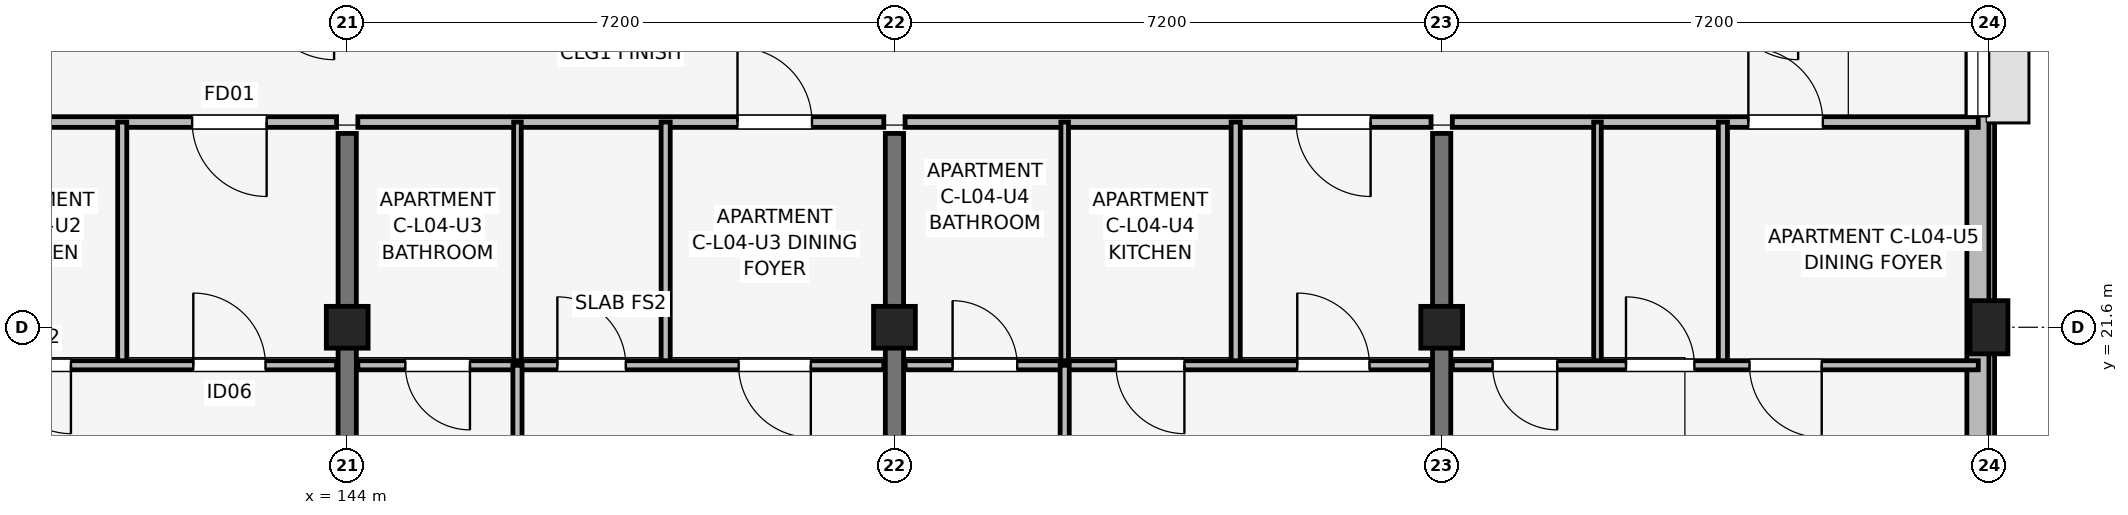
"""IFC4 building model, lengths in metres.
Left out: names, types, materials, properties, quantities, classifications, styles, units other than length and angle.
Written with IfcOpenShell. Run it as: python <this file> out.ifc"""

import sys

from ifc_helpers import new_model, si_unit, direction, frame, frame_2d, origin, origin_2d, place, context, subcontext, project, spatial, rectangle, extrude, element, fill, save


model = new_model("IFC4")
c1 = context("Model", 3, precision=1e-05, world=origin(), true_north=direction((0.0, 1.0)))
c2 = subcontext(c1, "Body", "Model", "MODEL_VIEW")
j1 = project(units=[si_unit("LENGTHUNIT", "METRE"), si_unit("PLANEANGLEUNIT", "RADIAN")], contexts=[c1])
p1 = place(None, origin())
s1 = spatial("IfcSite", under=j1, at=p1, CompositionType="ELEMENT")
p2 = place(p1, origin())
s2 = spatial("IfcBuilding", under=s1, at=p2, CompositionType="ELEMENT")
p3 = place(p2, frame((0.0, 0.0, 15.0)))
s3 = spatial("IfcBuildingStorey", under=s2, at=p3, CompositionType="ELEMENT", Elevation=15.0)
for number, where, z_axis, x_axis in (
    (1, (144.0, 21.6, 0.0), (0.0, 0.0, 1.0), (1.0, 0.0, 0.0)),
    (2, (151.2, 21.6, 0.0), (0.0, 0.0, 1.0), (1.0, 0.0, 0.0)),
    (3, (158.4, 21.6, 0.0), (0.0, 0.0, 1.0), (1.0, 0.0, 0.0)),
):
    element("IfcColumn", number, at=place(p3, frame(where, z_axis=z_axis, x_axis=x_axis)), inside=s3, PredefinedType="COLUMN", context=c2, shape_type="SweptSolid", body=[
        extrude(rectangle(XDim=0.55, YDim=0.55, at=origin_2d()), origin(), (0.0, 0.0, 1.0), 3.15),
    ])
p4 = place(p3, frame((165.6, 21.6, 0.0), z_axis=(0.0, 0.0, 1.0), x_axis=(1.0, 0.0, 0.0)))
e4 = element("IfcColumn", 4, at=p4, inside=s3, PredefinedType="COLUMN", context=c2, shape_type="SweptSolid", body=[
    extrude(rectangle(XDim=0.5, YDim=0.7, at=origin_2d()), origin(), (0.0, 0.0, 1.0), 3.15),
])
for number, where, z_axis, x_axis in (
    (5, (144.0, 14.75, 0.0), (0.0, 0.0, 1.0), (0.0, 1.0, 0.0)),
    (6, (151.2, 14.75, 0.0), (0.0, 0.0, 1.0), (0.0, 1.0, 0.0)),
    (7, (158.4, 14.75, 0.0), (0.0, 0.0, 1.0), (0.0, 1.0, 0.0)),
):
    element("IfcWall", number, at=place(p3, frame(where, z_axis=z_axis, x_axis=x_axis)), inside=s3, PredefinedType="SHEAR", context=c2, shape_type="SweptSolid", body=[
        extrude(rectangle(XDim=9.4, YDim=0.24, at=frame_2d((4.7, 0.0))), origin(), (0.0, 0.0, 1.0), 3.15),
    ])
p5 = place(p3, frame((165.455, 17.4, 0.0), z_axis=(0.0, 0.0, 1.0), x_axis=(0.0, 1.0, 0.0)))
e8 = element("IfcWall", 8, at=p5, inside=s3, PredefinedType="SOLIDWALL", context=c2, shape_type="SweptSolid", body=[
    extrude(rectangle(XDim=15.6, YDim=0.29, at=frame_2d((7.8, 0.0))), origin(), (0.0, 0.0, 1.0), 2.38),
])
p6 = place(p5, frame((6.975, 0.0, 1.05)))
e9 = element("IfcOpeningElement", 9, at=p6, cuts=e8, PredefinedType="OPENING", context=c2, shape_type="SweptSolid", body=[
    extrude(rectangle(XDim=1.65, YDim=1.15, at=frame_2d((0.825, 0.575))), frame((0.0, 0.155, 0.0), z_axis=(0.0, -1.0, 0.0), x_axis=(1.0, 0.0, 0.0)), (0.0, 0.0, 1.0), 0.31),
])
p7 = place(p5, frame((1.255, 0.0, 0.67)))
e10 = element("IfcOpeningElement", 10, at=p7, cuts=e8, PredefinedType="OPENING", context=c2, shape_type="SweptSolid", body=[
    extrude(rectangle(XDim=1.42, YDim=1.6, at=frame_2d((0.71, 0.8))), frame((0.0, 0.155, 0.0), z_axis=(0.0, -1.0, 0.0), x_axis=(1.0, 0.0, 0.0)), (0.0, 0.0, 1.0), 0.31),
])
p8 = place(p3, frame((136.94, 24.3, 0.0), z_axis=(0.0, 0.0, 1.0), x_axis=(1.0, 0.0, 0.0)))
e11 = element("IfcWall", 11, at=p8, inside=s3, PredefinedType="PARTITIONING", context=c2, shape_type="SweptSolid", body=[
    extrude(rectangle(XDim=6.92, YDim=0.14, at=frame_2d((3.46, 0.0))), origin(), (0.0, 0.0, 1.0), 2.38),
])
p9 = place(p8, frame((6.0, 0.0, 0.0), z_axis=(0.0, 0.0, 1.0), x_axis=(-1.0, 0.0, 0.0)))
e12 = element("IfcOpeningElement", 12, at=p9, cuts=e11, PredefinedType="OPENING", context=c2, shape_type="SweptSolid", body=[
    extrude(rectangle(XDim=0.98, YDim=2.1, at=frame_2d((0.49, 1.05))), frame((0.0, 0.08, 0.0), z_axis=(0.0, -1.0, 0.0), x_axis=(1.0, 0.0, 0.0)), (0.0, 0.0, 1.0), 0.16),
])
p10 = place(p3, frame((141.04, 21.1, 0.0), z_axis=(0.0, 0.0, 1.0), x_axis=(0.0, 1.0, 0.0)))
e13 = element("IfcWall", 13, at=p10, inside=s3, PredefinedType="PARTITIONING", context=c2, shape_type="SweptSolid", body=[
    extrude(rectangle(XDim=3.2, YDim=0.12, at=frame_2d((1.6, 0.0))), origin(), (0.0, 0.0, 1.0), 2.375),
])
p11 = place(p3, frame((136.94, 21.1, 0.0), z_axis=(0.0, 0.0, 1.0), x_axis=(1.0, 0.0, 0.0)))
e14 = element("IfcWall", 14, at=p11, inside=s3, PredefinedType="PARTITIONING", context=c2, shape_type="SweptSolid", body=[
    extrude(rectangle(XDim=6.92, YDim=0.12, at=frame_2d((3.46, 0.0))), origin(), (0.0, 0.0, 1.0), 2.38),
])
p12 = place(p11, frame((0.5, 0.0, 0.0)))
e15 = element("IfcOpeningElement", 15, at=p12, cuts=e14, PredefinedType="OPENING", context=c2, shape_type="SweptSolid", body=[
    extrude(rectangle(XDim=0.85, YDim=2.08, at=frame_2d((0.425, 1.04))), frame((0.0, 0.07, 0.0), z_axis=(0.0, -1.0, 0.0), x_axis=(1.0, 0.0, 0.0)), (0.0, 0.0, 1.0), 0.14),
])
p13 = place(p11, frame((3.425, 0.0, 0.0), z_axis=(0.0, 0.0, 1.0), x_axis=(-1.0, 0.0, 0.0)))
e16 = element("IfcOpeningElement", 16, at=p13, cuts=e14, PredefinedType="OPENING", context=c2, shape_type="SweptSolid", body=[
    extrude(rectangle(XDim=0.9, YDim=2.08, at=frame_2d((0.45, 1.04))), frame((0.0, 0.07, 0.0), z_axis=(0.0, -1.0, 0.0), x_axis=(1.0, 0.0, 0.0)), (0.0, 0.0, 1.0), 0.14),
])
p14 = place(p11, frame((5.035, 0.0, 0.0)))
e17 = element("IfcOpeningElement", 17, at=p14, cuts=e14, PredefinedType="OPENING", context=c2, shape_type="SweptSolid", body=[
    extrude(rectangle(XDim=0.95, YDim=2.08, at=frame_2d((0.475, 1.04))), frame((0.0, 0.07, 0.0), z_axis=(0.0, -1.0, 0.0), x_axis=(1.0, 0.0, 0.0)), (0.0, 0.0, 1.0), 0.14),
])
p15 = place(p3, frame((144.14, 24.3, 0.0), z_axis=(0.0, 0.0, 1.0), x_axis=(1.0, 0.0, 0.0)))
e18 = element("IfcWall", 18, at=p15, inside=s3, PredefinedType="PARTITIONING", context=c2, shape_type="SweptSolid", body=[
    extrude(rectangle(XDim=6.92, YDim=0.14, at=frame_2d((3.46, 0.0))), origin(), (0.0, 0.0, 1.0), 2.38),
])
p16 = place(p15, frame((4.995, 0.0, 0.0)))
e19 = element("IfcOpeningElement", 19, at=p16, cuts=e18, PredefinedType="OPENING", context=c2, shape_type="SweptSolid", body=[
    extrude(rectangle(XDim=0.98, YDim=2.1, at=frame_2d((0.49, 1.05))), frame((0.0, 0.08, 0.0), z_axis=(0.0, -1.0, 0.0), x_axis=(1.0, 0.0, 0.0)), (0.0, 0.0, 1.0), 0.16),
])
p17 = place(p3, frame((146.24, 21.1, 0.0), z_axis=(0.0, 0.0, 1.0), x_axis=(0.0, 1.0, 0.0)))
e20 = element("IfcWall", 20, at=p17, inside=s3, PredefinedType="PARTITIONING", context=c2, shape_type="SweptSolid", body=[
    extrude(rectangle(XDim=3.2, YDim=0.1, at=frame_2d((1.6, 0.0))), origin(), (0.0, 0.0, 1.0), 2.375),
])
p18 = place(p3, frame((148.19, 21.1, 0.0), z_axis=(0.0, 0.0, 1.0), x_axis=(0.0, 1.0, 0.0)))
e21 = element("IfcWall", 21, at=p18, inside=s3, PredefinedType="PARTITIONING", context=c2, shape_type="SweptSolid", body=[
    extrude(rectangle(XDim=3.2, YDim=0.12, at=frame_2d((1.6, 0.0))), origin(), (0.0, 0.0, 1.0), 2.375),
])
p19 = place(p3, frame((144.14, 21.1, 0.0), z_axis=(0.0, 0.0, 1.0), x_axis=(1.0, 0.0, 0.0)))
e22 = element("IfcWall", 22, at=p19, inside=s3, PredefinedType="PARTITIONING", context=c2, shape_type="SweptSolid", body=[
    extrude(rectangle(XDim=6.92, YDim=0.12, at=frame_2d((3.46, 0.0))), origin(), (0.0, 0.0, 1.0), 2.38),
])
p20 = place(p19, frame((1.475, 0.0, 0.0), z_axis=(0.0, 0.0, 1.0), x_axis=(-1.0, 0.0, 0.0)))
e23 = element("IfcOpeningElement", 23, at=p20, cuts=e22, PredefinedType="OPENING", context=c2, shape_type="SweptSolid", body=[
    extrude(rectangle(XDim=0.85, YDim=2.08, at=frame_2d((0.425, 1.04))), frame((0.0, 0.07, 0.0), z_axis=(0.0, -1.0, 0.0), x_axis=(1.0, 0.0, 0.0)), (0.0, 0.0, 1.0), 0.14),
])
p21 = place(p19, frame((2.625, 0.0, 0.0)))
e24 = element("IfcOpeningElement", 24, at=p21, cuts=e22, PredefinedType="OPENING", context=c2, shape_type="SweptSolid", body=[
    extrude(rectangle(XDim=0.9, YDim=2.08, at=frame_2d((0.45, 1.04))), frame((0.0, 0.07, 0.0), z_axis=(0.0, -1.0, 0.0), x_axis=(1.0, 0.0, 0.0)), (0.0, 0.0, 1.0), 0.14),
])
p22 = place(p19, frame((5.96, 0.0, 0.0), z_axis=(0.0, 0.0, 1.0), x_axis=(-1.0, 0.0, 0.0)))
e25 = element("IfcOpeningElement", 25, at=p22, cuts=e22, PredefinedType="OPENING", context=c2, shape_type="SweptSolid", body=[
    extrude(rectangle(XDim=0.95, YDim=2.08, at=frame_2d((0.475, 1.04))), frame((0.0, 0.07, 0.0), z_axis=(0.0, -1.0, 0.0), x_axis=(1.0, 0.0, 0.0)), (0.0, 0.0, 1.0), 0.14),
])
p23 = place(p3, frame((146.24, 14.7, 0.0), z_axis=(0.0, 0.0, 1.0), x_axis=(0.0, 1.0, 0.0)))
e26 = element("IfcWall", 26, at=p23, inside=s3, PredefinedType="PARTITIONING", context=c2, shape_type="SweptSolid", body=[
    extrude(rectangle(XDim=6.4, YDim=0.12, at=frame_2d((3.2, 0.0))), origin(), (0.0, 0.0, 1.0), 2.38),
])
p24 = place(p23, frame((2.75, 0.0, 0.0)))
e27 = element("IfcOpeningElement", 27, at=p24, cuts=e26, PredefinedType="OPENING", context=c2, shape_type="SweptSolid", body=[
    extrude(rectangle(XDim=0.9, YDim=2.08, at=frame_2d((0.45, 1.04))), frame((0.0, 0.07, 0.0), z_axis=(0.0, -1.0, 0.0), x_axis=(1.0, 0.0, 0.0)), (0.0, 0.0, 1.0), 0.14),
])
p25 = place(p3, frame((151.34, 24.3, 0.0), z_axis=(0.0, 0.0, 1.0), x_axis=(1.0, 0.0, 0.0)))
e28 = element("IfcWall", 28, at=p25, inside=s3, PredefinedType="PARTITIONING", context=c2, shape_type="SweptSolid", body=[
    extrude(rectangle(XDim=6.92, YDim=0.14, at=frame_2d((3.46, 0.0))), origin(), (0.0, 0.0, 1.0), 2.38),
])
p26 = place(p25, frame((6.125, 0.0, 0.0), z_axis=(0.0, 0.0, 1.0), x_axis=(-1.0, 0.0, 0.0)))
e29 = element("IfcOpeningElement", 29, at=p26, cuts=e28, PredefinedType="OPENING", context=c2, shape_type="SweptSolid", body=[
    extrude(rectangle(XDim=0.98, YDim=2.1, at=frame_2d((0.49, 1.05))), frame((0.0, 0.08, 0.0), z_axis=(0.0, -1.0, 0.0), x_axis=(1.0, 0.0, 0.0)), (0.0, 0.0, 1.0), 0.16),
])
p27 = place(p3, frame((153.44, 21.1, 0.0), z_axis=(0.0, 0.0, 1.0), x_axis=(0.0, 1.0, 0.0)))
e30 = element("IfcWall", 30, at=p27, inside=s3, PredefinedType="PARTITIONING", context=c2, shape_type="SweptSolid", body=[
    extrude(rectangle(XDim=3.2, YDim=0.1, at=frame_2d((1.6, 0.0))), origin(), (0.0, 0.0, 1.0), 2.375),
])
p28 = place(p3, frame((155.69, 21.1, 0.0), z_axis=(0.0, 0.0, 1.0), x_axis=(0.0, 1.0, 0.0)))
e31 = element("IfcWall", 31, at=p28, inside=s3, PredefinedType="PARTITIONING", context=c2, shape_type="SweptSolid", body=[
    extrude(rectangle(XDim=3.2, YDim=0.12, at=frame_2d((1.6, 0.0))), origin(), (0.0, 0.0, 1.0), 2.375),
])
p29 = place(p3, frame((151.34, 21.1, 0.0), z_axis=(0.0, 0.0, 1.0), x_axis=(1.0, 0.0, 0.0)))
e32 = element("IfcWall", 32, at=p29, inside=s3, PredefinedType="PARTITIONING", context=c2, shape_type="SweptSolid", body=[
    extrude(rectangle(XDim=6.92, YDim=0.12, at=frame_2d((3.46, 0.0))), origin(), (0.0, 0.0, 1.0), 2.38),
])
p30 = place(p29, frame((0.625, 0.0, 0.0)))
e33 = element("IfcOpeningElement", 33, at=p30, cuts=e32, PredefinedType="OPENING", context=c2, shape_type="SweptSolid", body=[
    extrude(rectangle(XDim=0.85, YDim=2.08, at=frame_2d((0.425, 1.04))), frame((0.0, 0.07, 0.0), z_axis=(0.0, -1.0, 0.0), x_axis=(1.0, 0.0, 0.0)), (0.0, 0.0, 1.0), 0.14),
])
p31 = place(p29, frame((3.675, 0.0, 0.0), z_axis=(0.0, 0.0, 1.0), x_axis=(-1.0, 0.0, 0.0)))
e34 = element("IfcOpeningElement", 34, at=p31, cuts=e32, PredefinedType="OPENING", context=c2, shape_type="SweptSolid", body=[
    extrude(rectangle(XDim=0.9, YDim=2.08, at=frame_2d((0.45, 1.04))), frame((0.0, 0.07, 0.0), z_axis=(0.0, -1.0, 0.0), x_axis=(1.0, 0.0, 0.0)), (0.0, 0.0, 1.0), 0.14),
])
p32 = place(p29, frame((5.16, 0.0, 0.0)))
e35 = element("IfcOpeningElement", 35, at=p32, cuts=e32, PredefinedType="OPENING", context=c2, shape_type="SweptSolid", body=[
    extrude(rectangle(XDim=0.95, YDim=2.08, at=frame_2d((0.475, 1.04))), frame((0.0, 0.07, 0.0), z_axis=(0.0, -1.0, 0.0), x_axis=(1.0, 0.0, 0.0)), (0.0, 0.0, 1.0), 0.14),
])
p33 = place(p3, frame((153.44, 14.7, 0.0), z_axis=(0.0, 0.0, 1.0), x_axis=(0.0, 1.0, 0.0)))
e36 = element("IfcWall", 36, at=p33, inside=s3, PredefinedType="PARTITIONING", context=c2, shape_type="SweptSolid", body=[
    extrude(rectangle(XDim=6.4, YDim=0.12, at=frame_2d((3.2, 0.0))), origin(), (0.0, 0.0, 1.0), 2.38),
])
p34 = place(p33, frame((3.65, 0.0, 0.0), z_axis=(0.0, 0.0, 1.0), x_axis=(-1.0, 0.0, 0.0)))
e37 = element("IfcOpeningElement", 37, at=p34, cuts=e36, PredefinedType="OPENING", context=c2, shape_type="SweptSolid", body=[
    extrude(rectangle(XDim=0.9, YDim=2.08, at=frame_2d((0.45, 1.04))), frame((0.0, 0.07, 0.0), z_axis=(0.0, -1.0, 0.0), x_axis=(1.0, 0.0, 0.0)), (0.0, 0.0, 1.0), 0.14),
])
p35 = place(p3, frame((158.54, 24.3, 0.0), z_axis=(0.0, 0.0, 1.0), x_axis=(1.0, 0.0, 0.0)))
e38 = element("IfcWall", 38, at=p35, inside=s3, PredefinedType="PARTITIONING", context=c2, shape_type="SweptSolid", body=[
    extrude(rectangle(XDim=6.92, YDim=0.14, at=frame_2d((3.46, 0.0))), origin(), (0.0, 0.0, 1.0), 2.38),
])
p36 = place(p35, frame((3.895, 0.0, 0.0)))
e39 = element("IfcOpeningElement", 39, at=p36, cuts=e38, PredefinedType="OPENING", context=c2, shape_type="SweptSolid", body=[
    extrude(rectangle(XDim=0.98, YDim=2.1, at=frame_2d((0.49, 1.05))), frame((0.0, 0.08, 0.0), z_axis=(0.0, -1.0, 0.0), x_axis=(1.0, 0.0, 0.0)), (0.0, 0.0, 1.0), 0.16),
])
p37 = place(p3, frame((160.45, 21.1, 0.0), z_axis=(0.0, 0.0, 1.0), x_axis=(0.0, 1.0, 0.0)))
e40 = element("IfcWall", 40, at=p37, inside=s3, PredefinedType="PARTITIONING", context=c2, shape_type="SweptSolid", body=[
    extrude(rectangle(XDim=3.2, YDim=0.1, at=frame_2d((1.6, 0.0))), origin(), (0.0, 0.0, 1.0), 2.375),
])
p38 = place(p3, frame((162.1, 21.1, 0.0), z_axis=(0.0, 0.0, 1.0), x_axis=(0.0, 1.0, 0.0)))
e41 = element("IfcWall", 41, at=p38, inside=s3, PredefinedType="PARTITIONING", context=c2, shape_type="SweptSolid", body=[
    extrude(rectangle(XDim=3.2, YDim=0.12, at=frame_2d((1.6, 0.0))), origin(), (0.0, 0.0, 1.0), 2.375),
])
p39 = place(p3, frame((158.54, 21.1, 0.0), z_axis=(0.0, 0.0, 1.0), x_axis=(1.0, 0.0, 0.0)))
e42 = element("IfcWall", 42, at=p39, inside=s3, PredefinedType="PARTITIONING", context=c2, shape_type="SweptSolid", body=[
    extrude(rectangle(XDim=6.92, YDim=0.12, at=frame_2d((3.46, 0.0))), origin(), (0.0, 0.0, 1.0), 2.38),
])
p40 = place(p39, frame((1.38, 0.0, 0.0), z_axis=(0.0, 0.0, 1.0), x_axis=(-1.0, 0.0, 0.0)))
e43 = element("IfcOpeningElement", 43, at=p40, cuts=e42, PredefinedType="OPENING", context=c2, shape_type="SweptSolid", body=[
    extrude(rectangle(XDim=0.85, YDim=2.08, at=frame_2d((0.425, 1.04))), frame((0.0, 0.07, 0.0), z_axis=(0.0, -1.0, 0.0), x_axis=(1.0, 0.0, 0.0)), (0.0, 0.0, 1.0), 0.14),
])
p41 = place(p39, frame((2.285, 0.0, 0.0)))
e44 = element("IfcOpeningElement", 44, at=p41, cuts=e42, PredefinedType="OPENING", context=c2, shape_type="SweptSolid", body=[
    extrude(rectangle(XDim=0.9, YDim=2.08, at=frame_2d((0.45, 1.04))), frame((0.0, 0.07, 0.0), z_axis=(0.0, -1.0, 0.0), x_axis=(1.0, 0.0, 0.0)), (0.0, 0.0, 1.0), 0.14),
])
p42 = place(p39, frame((4.86, 0.0, 0.0), z_axis=(0.0, 0.0, 1.0), x_axis=(-1.0, 0.0, 0.0)))
e45 = element("IfcOpeningElement", 45, at=p42, cuts=e42, PredefinedType="OPENING", context=c2, shape_type="SweptSolid", body=[
    extrude(rectangle(XDim=0.95, YDim=2.08, at=frame_2d((0.475, 1.04))), frame((0.0, 0.07, 0.0), z_axis=(0.0, -1.0, 0.0), x_axis=(1.0, 0.0, 0.0)), (0.0, 0.0, 1.0), 0.14),
])
p43 = place(p6, origin())
e46 = element("IfcWindow", 46, at=p43, inside=s3, PartitioningType="SINGLE_PANEL", PredefinedType="WINDOW", context=c2, shape_type="SweptSolid", body=[
    extrude(rectangle(XDim=1.65, YDim=1.15, at=frame_2d((0.825, 0.575))), frame((0.0, 0.03, 0.0), z_axis=(0.0, -1.0, 0.0), x_axis=(1.0, 0.0, 0.0)), (0.0, 0.0, 1.0), 0.06),
])
fill(e9, e46)
p44 = place(p9, origin())
e47 = element("IfcDoor", 47, at=p44, inside=s3, OperationType="SINGLE_SWING_RIGHT", PredefinedType="DOOR", context=c2, shape_type="SweptSolid", body=[
    extrude(rectangle(XDim=0.98, YDim=2.1, at=frame_2d((0.49, 1.05))), frame((0.0, 0.025, 0.0), z_axis=(0.0, -1.0, 0.0), x_axis=(1.0, 0.0, 0.0)), (0.0, 0.0, 1.0), 0.05),
])
fill(e12, e47)
p45 = place(p13, origin())
e48 = element("IfcDoor", 48, at=p45, inside=s3, OperationType="SINGLE_SWING_RIGHT", PredefinedType="DOOR", context=c2, shape_type="SweptSolid", body=[
    extrude(rectangle(XDim=0.9, YDim=2.08, at=frame_2d((0.45, 1.04))), frame((0.0, 0.025, 0.0), z_axis=(0.0, -1.0, 0.0), x_axis=(1.0, 0.0, 0.0)), (0.0, 0.0, 1.0), 0.05),
])
fill(e16, e48)
p46 = place(p14, origin())
e49 = element("IfcDoor", 49, at=p46, inside=s3, OperationType="SINGLE_SWING_LEFT", PredefinedType="DOOR", context=c2, shape_type="SweptSolid", body=[
    extrude(rectangle(XDim=0.95, YDim=2.08, at=frame_2d((0.475, 1.04))), frame((0.0, 0.025, 0.0), z_axis=(0.0, -1.0, 0.0), x_axis=(1.0, 0.0, 0.0)), (0.0, 0.0, 1.0), 0.05),
])
fill(e17, e49)
p47 = place(p16, origin())
e50 = element("IfcDoor", 50, at=p47, inside=s3, OperationType="SINGLE_SWING_LEFT", PredefinedType="DOOR", context=c2, shape_type="SweptSolid", body=[
    extrude(rectangle(XDim=0.98, YDim=2.1, at=frame_2d((0.49, 1.05))), frame((0.0, 0.025, 0.0), z_axis=(0.0, -1.0, 0.0), x_axis=(1.0, 0.0, 0.0)), (0.0, 0.0, 1.0), 0.05),
])
fill(e19, e50)
p48 = place(p20, origin())
e51 = element("IfcDoor", 51, at=p48, inside=s3, OperationType="SINGLE_SWING_RIGHT", PredefinedType="DOOR", context=c2, shape_type="SweptSolid", body=[
    extrude(rectangle(XDim=0.85, YDim=2.08, at=frame_2d((0.425, 1.04))), frame((0.0, 0.025, 0.0), z_axis=(0.0, -1.0, 0.0), x_axis=(1.0, 0.0, 0.0)), (0.0, 0.0, 1.0), 0.05),
])
fill(e23, e51)
p49 = place(p21, origin())
e52 = element("IfcDoor", 52, at=p49, inside=s3, OperationType="SINGLE_SWING_LEFT", PredefinedType="DOOR", context=c2, shape_type="SweptSolid", body=[
    extrude(rectangle(XDim=0.9, YDim=2.08, at=frame_2d((0.45, 1.04))), frame((0.0, 0.025, 0.0), z_axis=(0.0, -1.0, 0.0), x_axis=(1.0, 0.0, 0.0)), (0.0, 0.0, 1.0), 0.05),
])
fill(e24, e52)
p50 = place(p22, origin())
e53 = element("IfcDoor", 53, at=p50, inside=s3, OperationType="SINGLE_SWING_RIGHT", PredefinedType="DOOR", context=c2, shape_type="SweptSolid", body=[
    extrude(rectangle(XDim=0.95, YDim=2.08, at=frame_2d((0.475, 1.04))), frame((0.0, 0.025, 0.0), z_axis=(0.0, -1.0, 0.0), x_axis=(1.0, 0.0, 0.0)), (0.0, 0.0, 1.0), 0.05),
])
fill(e25, e53)
p51 = place(p26, origin())
e54 = element("IfcDoor", 54, at=p51, inside=s3, OperationType="SINGLE_SWING_RIGHT", PredefinedType="DOOR", context=c2, shape_type="SweptSolid", body=[
    extrude(rectangle(XDim=0.98, YDim=2.1, at=frame_2d((0.49, 1.05))), frame((0.0, 0.025, 0.0), z_axis=(0.0, -1.0, 0.0), x_axis=(1.0, 0.0, 0.0)), (0.0, 0.0, 1.0), 0.05),
])
fill(e29, e54)
p52 = place(p30, origin())
e55 = element("IfcDoor", 55, at=p52, inside=s3, OperationType="SINGLE_SWING_LEFT", PredefinedType="DOOR", context=c2, shape_type="SweptSolid", body=[
    extrude(rectangle(XDim=0.85, YDim=2.08, at=frame_2d((0.425, 1.04))), frame((0.0, 0.025, 0.0), z_axis=(0.0, -1.0, 0.0), x_axis=(1.0, 0.0, 0.0)), (0.0, 0.0, 1.0), 0.05),
])
fill(e33, e55)
p53 = place(p31, origin())
e56 = element("IfcDoor", 56, at=p53, inside=s3, OperationType="SINGLE_SWING_RIGHT", PredefinedType="DOOR", context=c2, shape_type="SweptSolid", body=[
    extrude(rectangle(XDim=0.9, YDim=2.08, at=frame_2d((0.45, 1.04))), frame((0.0, 0.025, 0.0), z_axis=(0.0, -1.0, 0.0), x_axis=(1.0, 0.0, 0.0)), (0.0, 0.0, 1.0), 0.05),
])
fill(e34, e56)
p54 = place(p32, origin())
e57 = element("IfcDoor", 57, at=p54, inside=s3, OperationType="SINGLE_SWING_LEFT", PredefinedType="DOOR", context=c2, shape_type="SweptSolid", body=[
    extrude(rectangle(XDim=0.95, YDim=2.08, at=frame_2d((0.475, 1.04))), frame((0.0, 0.025, 0.0), z_axis=(0.0, -1.0, 0.0), x_axis=(1.0, 0.0, 0.0)), (0.0, 0.0, 1.0), 0.05),
])
fill(e35, e57)
p55 = place(p36, origin())
e58 = element("IfcDoor", 58, at=p55, inside=s3, OperationType="SINGLE_SWING_LEFT", PredefinedType="DOOR", context=c2, shape_type="SweptSolid", body=[
    extrude(rectangle(XDim=0.98, YDim=2.1, at=frame_2d((0.49, 1.05))), frame((0.0, 0.025, 0.0), z_axis=(0.0, -1.0, 0.0), x_axis=(1.0, 0.0, 0.0)), (0.0, 0.0, 1.0), 0.05),
])
fill(e39, e58)
p56 = place(p40, origin())
e59 = element("IfcDoor", 59, at=p56, inside=s3, OperationType="SINGLE_SWING_RIGHT", PredefinedType="DOOR", context=c2, shape_type="SweptSolid", body=[
    extrude(rectangle(XDim=0.85, YDim=2.08, at=frame_2d((0.425, 1.04))), frame((0.0, 0.025, 0.0), z_axis=(0.0, -1.0, 0.0), x_axis=(1.0, 0.0, 0.0)), (0.0, 0.0, 1.0), 0.05),
])
fill(e43, e59)
p57 = place(p41, origin())
e60 = element("IfcDoor", 60, at=p57, inside=s3, OperationType="SINGLE_SWING_LEFT", PredefinedType="DOOR", context=c2, shape_type="SweptSolid", body=[
    extrude(rectangle(XDim=0.9, YDim=2.08, at=frame_2d((0.45, 1.04))), frame((0.0, 0.025, 0.0), z_axis=(0.0, -1.0, 0.0), x_axis=(1.0, 0.0, 0.0)), (0.0, 0.0, 1.0), 0.05),
])
fill(e44, e60)
p58 = place(p42, origin())
e61 = element("IfcDoor", 61, at=p58, inside=s3, OperationType="SINGLE_SWING_RIGHT", PredefinedType="DOOR", context=c2, shape_type="SweptSolid", body=[
    extrude(rectangle(XDim=0.95, YDim=2.08, at=frame_2d((0.475, 1.04))), frame((0.0, 0.025, 0.0), z_axis=(0.0, -1.0, 0.0), x_axis=(1.0, 0.0, 0.0)), (0.0, 0.0, 1.0), 0.05),
])
fill(e45, e61)
save(model, sys.argv[1])
